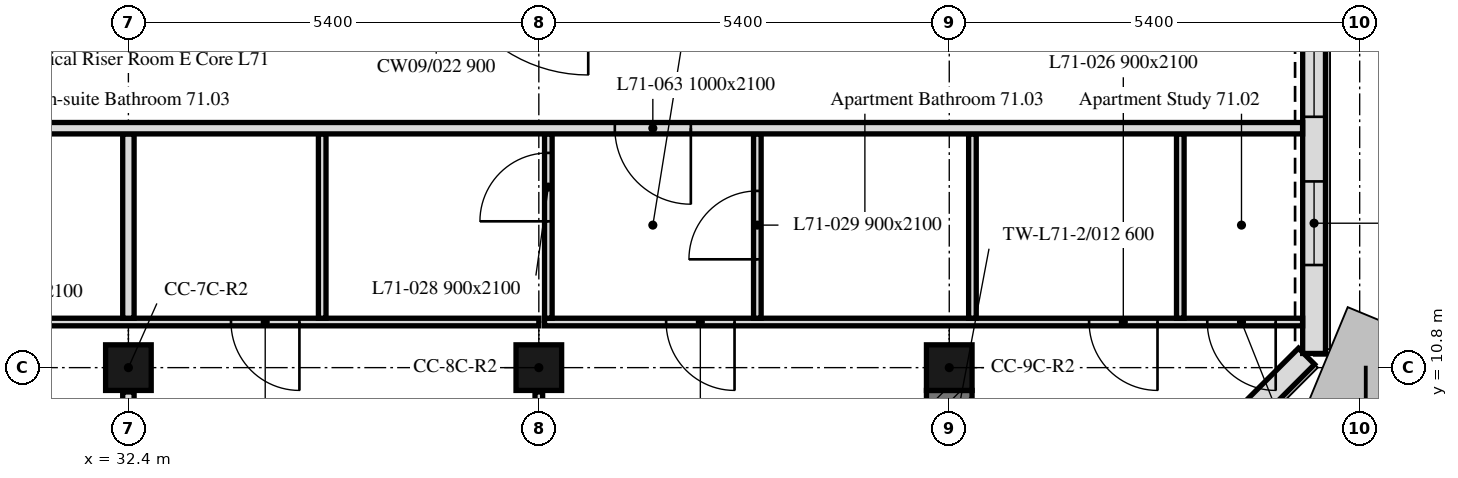
"""IFC4 building model, lengths in metres.
Left out: names, types, materials, properties, quantities, classifications, styles, units other than length and angle.
Written with IfcOpenShell. Run it as: python <this file> out.ifc"""

import sys

from ifc_helpers import new_model, si_unit, direction, frame, frame_2d, origin, origin_2d, place, context, subcontext, project, spatial, rectangle, extrude, element, fill, save


model = new_model("IFC4")
c1 = context("Model", 3, precision=1e-05, world=origin(), true_north=direction((0.0, 1.0)))
c2 = subcontext(c1, "Body", "Model", "MODEL_VIEW")
j1 = project(units=[si_unit("LENGTHUNIT", "METRE"), si_unit("PLANEANGLEUNIT", "RADIAN")], contexts=[c1])
p1 = place(None, origin())
s1 = spatial("IfcSite", under=j1, at=p1, CompositionType="ELEMENT")
p2 = place(p1, origin())
s2 = spatial("IfcBuilding", under=s1, at=p2, CompositionType="ELEMENT")
p3 = place(p2, frame((0.0, 0.0, 288.4)))
s3 = spatial("IfcBuildingStorey", under=s2, at=p3, CompositionType="ELEMENT", Elevation=288.4)
for number, where, z_axis, x_axis in (
    (1, (32.4, 10.8, 0.0), (0.0, 0.0, 1.0), (1.0, 0.0, 0.0)),
    (2, (37.8, 10.8, 0.0), (0.0, 0.0, 1.0), (1.0, 0.0, 0.0)),
    (3, (43.2, 10.8, 0.0), (0.0, 0.0, 1.0), (1.0, 0.0, 0.0)),
):
    element("IfcColumn", number, at=place(p3, frame(where, z_axis=z_axis, x_axis=x_axis)), inside=s3, PredefinedType="COLUMN", context=c2, shape_type="SweptSolid", body=[
        extrude(rectangle(XDim=0.6, YDim=0.6, at=origin_2d()), origin(), (0.0, 0.0, 1.0), 3.0),
    ])
p4 = place(p3, frame((43.2, 8.7, 0.0), z_axis=(0.0, 0.0, 1.0), x_axis=(0.0, 1.0, 0.0)))
e4 = element("IfcWall", 4, at=p4, inside=s3, PredefinedType="SHEAR", context=c2, shape_type="SweptSolid", body=[
    extrude(rectangle(XDim=1.8, YDim=0.6, at=frame_2d((0.9, 0.0))), origin(), (0.0, 0.0, 1.0), 3.0),
])
p5 = place(p3, frame((43.051, 6.099, 0.0), z_axis=(0.0, 0.0, 1.0), x_axis=(0.707106781187, 0.707106781187, 0.0)))
e5 = element("IfcWall", 5, at=p5, inside=s3, PredefinedType="SOLIDWALL", context=c2, shape_type="SweptSolid", body=[
    extrude(rectangle(XDim=6.86, YDim=0.3, at=frame_2d((3.43, 0.0))), origin(), (0.0, 0.0, 1.0), 3.0),
])
p6 = place(p5, frame((1.73, 0.0, 0.9)))
e6 = element("IfcOpeningElement", 6, at=p6, cuts=e5, PredefinedType="OPENING", context=c2, shape_type="SweptSolid", body=[
    extrude(rectangle(XDim=3.4, YDim=1.7, at=frame_2d((1.7, 0.85))), frame((0.0, 0.16, 0.0), z_axis=(0.0, -1.0, 0.0), x_axis=(1.0, 0.0, 0.0)), (0.0, 0.0, 1.0), 0.32),
])
p7 = place(p3, frame((48.0, 10.986, 0.0), z_axis=(0.0, 0.0, 1.0), x_axis=(0.0, 1.0, 0.0)))
e7 = element("IfcWall", 7, at=p7, inside=s3, PredefinedType="SOLIDWALL", context=c2, shape_type="SweptSolid", body=[
    extrude(rectangle(XDim=32.027, YDim=0.3, at=frame_2d((16.014, 0.0))), origin(), (0.0, 0.0, 1.0), 3.0),
])
p8 = place(p7, frame((1.164, 0.0, 0.9)))
e8 = element("IfcOpeningElement", 8, at=p8, cuts=e7, PredefinedType="OPENING", context=c2, shape_type="SweptSolid", body=[
    extrude(rectangle(XDim=1.1, YDim=1.7, at=frame_2d((0.55, 0.85))), frame((0.0, 0.16, 0.0), z_axis=(0.0, -1.0, 0.0), x_axis=(1.0, 0.0, 0.0)), (0.0, 0.0, 1.0), 0.32),
])
p9 = place(p7, frame((3.114, 0.0, 0.9)))
e9 = element("IfcOpeningElement", 9, at=p9, cuts=e7, PredefinedType="OPENING", context=c2, shape_type="SweptSolid", body=[
    extrude(rectangle(XDim=1.1, YDim=1.7, at=frame_2d((0.55, 0.85))), frame((0.0, 0.16, 0.0), z_axis=(0.0, -1.0, 0.0), x_axis=(1.0, 0.0, 0.0)), (0.0, 0.0, 1.0), 0.32),
])
p10 = place(p7, frame((7.664, 0.0, 0.9)))
e10 = element("IfcOpeningElement", 10, at=p10, cuts=e7, PredefinedType="OPENING", context=c2, shape_type="SweptSolid", body=[
    extrude(rectangle(XDim=0.5, YDim=1.7, at=frame_2d((0.25, 0.85))), frame((0.0, 0.16, 0.0), z_axis=(0.0, -1.0, 0.0), x_axis=(1.0, 0.0, 0.0)), (0.0, 0.0, 1.0), 0.32),
])
p11 = place(p7, frame((13.064, 0.0, 0.9)))
e11 = element("IfcOpeningElement", 11, at=p11, cuts=e7, PredefinedType="OPENING", context=c2, shape_type="SweptSolid", body=[
    extrude(rectangle(XDim=0.5, YDim=1.7, at=frame_2d((0.25, 0.85))), frame((0.0, 0.16, 0.0), z_axis=(0.0, -1.0, 0.0), x_axis=(1.0, 0.0, 0.0)), (0.0, 0.0, 1.0), 0.32),
])
p12 = place(p7, frame((18.464, 0.0, 0.9)))
e12 = element("IfcOpeningElement", 12, at=p12, cuts=e7, PredefinedType="OPENING", context=c2, shape_type="SweptSolid", body=[
    extrude(rectangle(XDim=0.5, YDim=1.7, at=frame_2d((0.25, 0.85))), frame((0.0, 0.16, 0.0), z_axis=(0.0, -1.0, 0.0), x_axis=(1.0, 0.0, 0.0)), (0.0, 0.0, 1.0), 0.32),
])
p13 = place(p7, frame((23.864, 0.0, 0.9)))
e13 = element("IfcOpeningElement", 13, at=p13, cuts=e7, PredefinedType="OPENING", context=c2, shape_type="SweptSolid", body=[
    extrude(rectangle(XDim=0.5, YDim=1.7, at=frame_2d((0.25, 0.85))), frame((0.0, 0.16, 0.0), z_axis=(0.0, -1.0, 0.0), x_axis=(1.0, 0.0, 0.0)), (0.0, 0.0, 1.0), 0.32),
])
p14 = place(p7, frame((28.164, 0.0, 0.9)))
e14 = element("IfcOpeningElement", 14, at=p14, cuts=e7, PredefinedType="OPENING", context=c2, shape_type="SweptSolid", body=[
    extrude(rectangle(XDim=1.1, YDim=1.7, at=frame_2d((0.55, 0.85))), frame((0.0, 0.16, 0.0), z_axis=(0.0, -1.0, 0.0), x_axis=(1.0, 0.0, 0.0)), (0.0, 0.0, 1.0), 0.32),
])
p15 = place(p7, frame((29.589, 0.0, 0.9)))
e15 = element("IfcOpeningElement", 15, at=p15, cuts=e7, PredefinedType="OPENING", context=c2, shape_type="SweptSolid", body=[
    extrude(rectangle(XDim=0.65, YDim=1.7, at=frame_2d((0.325, 0.85))), frame((0.0, 0.16, 0.0), z_axis=(0.0, -1.0, 0.0), x_axis=(1.0, 0.0, 0.0)), (0.0, 0.0, 1.0), 0.32),
])
p16 = place(p3, frame((37.8, 11.4, 0.0), z_axis=(0.0, 0.0, 1.0), x_axis=(-1.0, 0.0, 0.0)))
e16 = element("IfcWall", 16, at=p16, inside=s3, PredefinedType="PARTITIONING", context=c2, shape_type="SweptSolid", body=[
    extrude(rectangle(XDim=21.6, YDim=0.1, at=frame_2d((10.8, 0.0))), origin(), (0.0, 0.0, 1.0), 3.0),
])
p17 = place(p16, frame((18.87, 0.0, 0.0)))
e17 = element("IfcOpeningElement", 17, at=p17, cuts=e16, PredefinedType="OPENING", context=c2, shape_type="SweptSolid", body=[
    extrude(rectangle(XDim=0.9, YDim=2.1, at=frame_2d((0.45, 1.05))), frame((0.0, 0.05, 0.0), z_axis=(0.0, -1.0, 0.0), x_axis=(1.0, 0.0, 0.0)), (0.0, 0.0, 1.0), 0.1),
])
p18 = place(p16, frame((17.5, 0.0, 0.0)))
e18 = element("IfcOpeningElement", 18, at=p18, cuts=e16, PredefinedType="OPENING", context=c2, shape_type="SweptSolid", body=[
    extrude(rectangle(XDim=0.9, YDim=2.1, at=frame_2d((0.45, 1.05))), frame((0.0, 0.05, 0.0), z_axis=(0.0, -1.0, 0.0), x_axis=(1.0, 0.0, 0.0)), (0.0, 0.0, 1.0), 0.1),
])
p19 = place(p16, frame((6.917, 0.0, 0.0)))
e19 = element("IfcOpeningElement", 19, at=p19, cuts=e16, PredefinedType="OPENING", context=c2, shape_type="SweptSolid", body=[
    extrude(rectangle(XDim=0.9, YDim=2.1, at=frame_2d((0.45, 1.05))), frame((0.0, 0.05, 0.0), z_axis=(0.0, -1.0, 0.0), x_axis=(1.0, 0.0, 0.0)), (0.0, 0.0, 1.0), 0.1),
])
p20 = place(p16, frame((3.15, 0.0, 0.0)))
e20 = element("IfcOpeningElement", 20, at=p20, cuts=e16, PredefinedType="OPENING", context=c2, shape_type="SweptSolid", body=[
    extrude(rectangle(XDim=0.9, YDim=2.1, at=frame_2d((0.45, 1.05))), frame((0.0, 0.05, 0.0), z_axis=(0.0, -1.0, 0.0), x_axis=(1.0, 0.0, 0.0)), (0.0, 0.0, 1.0), 0.1),
])
p21 = place(p16, frame((14.158, 0.0, 0.0)))
e21 = element("IfcOpeningElement", 21, at=p21, cuts=e16, PredefinedType="OPENING", context=c2, shape_type="SweptSolid", body=[
    extrude(rectangle(XDim=0.9, YDim=2.1, at=frame_2d((0.45, 1.05))), frame((0.0, 0.05, 0.0), z_axis=(0.0, -1.0, 0.0), x_axis=(1.0, 0.0, 0.0)), (0.0, 0.0, 1.0), 0.1),
])
p22 = place(p16, frame((12.788, 0.0, 0.0)))
e22 = element("IfcOpeningElement", 22, at=p22, cuts=e16, PredefinedType="OPENING", context=c2, shape_type="SweptSolid", body=[
    extrude(rectangle(XDim=0.9, YDim=2.1, at=frame_2d((0.45, 1.05))), frame((0.0, 0.05, 0.0), z_axis=(0.0, -1.0, 0.0), x_axis=(1.0, 0.0, 0.0)), (0.0, 0.0, 1.0), 0.1),
])
p23 = place(p3, frame((32.4, 6.151, 0.0), z_axis=(0.0, 0.0, 1.0), x_axis=(0.0, 1.0, 0.0)))
e23 = element("IfcWall", 23, at=p23, inside=s3, PredefinedType="PARTITIONING", context=c2, shape_type="SweptSolid", body=[
    extrude(rectangle(XDim=4.329, YDim=0.15, at=frame_2d((2.165, 0.0))), origin(), (0.0, 0.0, 1.0), 3.0),
])
p24 = place(p3, frame((32.4, 11.45, 0.0), z_axis=(0.0, 0.0, 1.0), x_axis=(0.0, 1.0, 0.0)))
e24 = element("IfcWall", 24, at=p24, inside=s3, PredefinedType="PARTITIONING", context=c2, shape_type="SweptSolid", body=[
    extrude(rectangle(XDim=2.425, YDim=0.15, at=frame_2d((1.212, 0.0))), origin(), (0.0, 0.0, 1.0), 3.0),
])
p25 = place(p3, frame((37.8, 6.151, 0.0), z_axis=(0.0, 0.0, 1.0), x_axis=(0.0, 1.0, 0.0)))
e25 = element("IfcWall", 25, at=p25, inside=s3, PredefinedType="PARTITIONING", context=c2, shape_type="SweptSolid", body=[
    extrude(rectangle(XDim=4.329, YDim=0.1, at=frame_2d((2.165, 0.0))), origin(), (0.0, 0.0, 1.0), 3.0),
])
p26 = place(p25, frame((1.424, 0.0, 0.0)))
e26 = element("IfcOpeningElement", 26, at=p26, cuts=e25, PredefinedType="OPENING", context=c2, shape_type="SweptSolid", body=[
    extrude(rectangle(XDim=0.9, YDim=2.1, at=frame_2d((0.45, 1.05))), frame((0.0, 0.05, 0.0), z_axis=(0.0, -1.0, 0.0), x_axis=(1.0, 0.0, 0.0)), (0.0, 0.0, 1.0), 0.1),
])
p27 = place(p3, frame((47.849, 11.4, 0.0), z_axis=(0.0, 0.0, 1.0), x_axis=(-1.0, 0.0, 0.0)))
e27 = element("IfcWall", 27, at=p27, inside=s3, PredefinedType="PARTITIONING", context=c2, shape_type="SweptSolid", body=[
    extrude(rectangle(XDim=9.974, YDim=0.1, at=frame_2d((4.987, 0.0))), origin(), (0.0, 0.0, 1.0), 3.0),
])
p28 = place(p27, frame((1.909, 0.0, 0.0)))
e28 = element("IfcOpeningElement", 28, at=p28, cuts=e27, PredefinedType="OPENING", context=c2, shape_type="SweptSolid", body=[
    extrude(rectangle(XDim=0.9, YDim=2.1, at=frame_2d((0.45, 1.05))), frame((0.0, 0.05, 0.0), z_axis=(0.0, -1.0, 0.0), x_axis=(1.0, 0.0, 0.0)), (0.0, 0.0, 1.0), 0.1),
])
p29 = place(p27, frame((0.354, 0.0, 0.0)))
e29 = element("IfcOpeningElement", 29, at=p29, cuts=e27, PredefinedType="OPENING", context=c2, shape_type="SweptSolid", body=[
    extrude(rectangle(XDim=0.9, YDim=2.1, at=frame_2d((0.45, 1.05))), frame((0.0, 0.05, 0.0), z_axis=(0.0, -1.0, 0.0), x_axis=(1.0, 0.0, 0.0)), (0.0, 0.0, 1.0), 0.1),
])
p30 = place(p27, frame((7.474, 0.0, 0.0)))
e30 = element("IfcOpeningElement", 30, at=p30, cuts=e27, PredefinedType="OPENING", context=c2, shape_type="SweptSolid", body=[
    extrude(rectangle(XDim=0.9, YDim=2.1, at=frame_2d((0.45, 1.05))), frame((0.0, 0.05, 0.0), z_axis=(0.0, -1.0, 0.0), x_axis=(1.0, 0.0, 0.0)), (0.0, 0.0, 1.0), 0.1),
])
p31 = place(p3, frame((34.95, 11.45, 0.0), z_axis=(0.0, 0.0, 1.0), x_axis=(0.0, 1.0, 0.0)))
e31 = element("IfcWall", 31, at=p31, inside=s3, PredefinedType="PARTITIONING", context=c2, shape_type="SweptSolid", body=[
    extrude(rectangle(XDim=2.425, YDim=0.1, at=frame_2d((1.212, 0.0))), origin(), (0.0, 0.0, 1.0), 3.0),
])
p32 = place(p3, frame((37.925, 11.45, 0.0), z_axis=(0.0, 0.0, 1.0), x_axis=(0.0, 1.0, 0.0)))
e32 = element("IfcWall", 32, at=p32, inside=s3, PredefinedType="PARTITIONING", context=c2, shape_type="SweptSolid", body=[
    extrude(rectangle(XDim=2.425, YDim=0.1, at=frame_2d((1.212, 0.0))), origin(), (0.0, 0.0, 1.0), 3.0),
])
p33 = place(p32, frame((1.275, 0.0, 0.0)))
e33 = element("IfcOpeningElement", 33, at=p33, cuts=e32, PredefinedType="OPENING", context=c2, shape_type="SweptSolid", body=[
    extrude(rectangle(XDim=0.9, YDim=2.1, at=frame_2d((0.45, 1.05))), frame((0.0, 0.05, 0.0), z_axis=(0.0, -1.0, 0.0), x_axis=(1.0, 0.0, 0.0)), (0.0, 0.0, 1.0), 0.1),
])
p34 = place(p3, frame((40.675, 11.45, 0.0), z_axis=(0.0, 0.0, 1.0), x_axis=(0.0, 1.0, 0.0)))
e34 = element("IfcWall", 34, at=p34, inside=s3, PredefinedType="PARTITIONING", context=c2, shape_type="SweptSolid", body=[
    extrude(rectangle(XDim=2.425, YDim=0.1, at=frame_2d((1.212, 0.0))), origin(), (0.0, 0.0, 1.0), 3.0),
])
p35 = place(p34, frame((0.775, 0.0, 0.0)))
e35 = element("IfcOpeningElement", 35, at=p35, cuts=e34, PredefinedType="OPENING", context=c2, shape_type="SweptSolid", body=[
    extrude(rectangle(XDim=0.9, YDim=2.1, at=frame_2d((0.45, 1.05))), frame((0.0, 0.05, 0.0), z_axis=(0.0, -1.0, 0.0), x_axis=(1.0, 0.0, 0.0)), (0.0, 0.0, 1.0), 0.1),
])
for number, where, z_axis, x_axis in (
    (36, (43.505, 11.45, 0.0), (0.0, 0.0, 1.0), (0.0, 1.0, 0.0)),
    (37, (46.24, 11.45, 0.0), (0.0, 0.0, 1.0), (0.0, 1.0, 0.0)),
):
    element("IfcWall", number, at=place(p3, frame(where, z_axis=z_axis, x_axis=x_axis)), inside=s3, PredefinedType="PARTITIONING", context=c2, shape_type="SweptSolid", body=[
        extrude(rectangle(XDim=2.425, YDim=0.1, at=frame_2d((1.212, 0.0))), origin(), (0.0, 0.0, 1.0), 3.0),
    ])
p36 = place(p3, frame((47.849, 13.95, 0.0), z_axis=(0.0, 0.0, 1.0), x_axis=(-1.0, 0.0, 0.0)))
e38 = element("IfcWall", 38, at=p36, inside=s3, PredefinedType="PARTITIONING", context=c2, shape_type="SweptSolid", body=[
    extrude(rectangle(XDim=41.698, YDim=0.15, at=frame_2d((20.849, 0.0))), origin(), (0.0, 0.0, 1.0), 3.0),
])
p37 = place(p36, frame((35.609, 0.0, 0.0)))
e39 = element("IfcOpeningElement", 39, at=p37, cuts=e38, PredefinedType="OPENING", context=c2, shape_type="SweptSolid", body=[
    extrude(rectangle(XDim=1.0, YDim=2.1, at=frame_2d((0.5, 1.05))), frame((0.0, 0.075, 0.0), z_axis=(0.0, -1.0, 0.0), x_axis=(1.0, 0.0, 0.0)), (0.0, 0.0, 1.0), 0.15),
])
p38 = place(p36, frame((22.354, 0.0, 0.0)))
e40 = element("IfcOpeningElement", 40, at=p38, cuts=e38, PredefinedType="OPENING", context=c2, shape_type="SweptSolid", body=[
    extrude(rectangle(XDim=1.0, YDim=2.1, at=frame_2d((0.5, 1.05))), frame((0.0, 0.075, 0.0), z_axis=(0.0, -1.0, 0.0), x_axis=(1.0, 0.0, 0.0)), (0.0, 0.0, 1.0), 0.15),
])
p39 = place(p36, frame((8.049, 0.0, 0.0)))
e41 = element("IfcOpeningElement", 41, at=p39, cuts=e38, PredefinedType="OPENING", context=c2, shape_type="SweptSolid", body=[
    extrude(rectangle(XDim=1.0, YDim=2.1, at=frame_2d((0.5, 1.05))), frame((0.0, 0.075, 0.0), z_axis=(0.0, -1.0, 0.0), x_axis=(1.0, 0.0, 0.0)), (0.0, 0.0, 1.0), 0.15),
])
p40 = place(p8, origin())
e42 = element("IfcWindow", 42, at=p40, inside=s3, PartitioningType="SINGLE_PANEL", PredefinedType="WINDOW", context=c2, shape_type="SweptSolid", body=[
    extrude(rectangle(XDim=1.1, YDim=1.7, at=frame_2d((0.55, 0.85))), frame((0.0, 0.03, 0.0), z_axis=(0.0, -1.0, 0.0), x_axis=(1.0, 0.0, 0.0)), (0.0, 0.0, 1.0), 0.06),
])
fill(e8, e42)
p41 = place(p9, origin())
e43 = element("IfcWindow", 43, at=p41, inside=s3, PartitioningType="SINGLE_PANEL", PredefinedType="WINDOW", context=c2, shape_type="SweptSolid", body=[
    extrude(rectangle(XDim=1.1, YDim=1.7, at=frame_2d((0.55, 0.85))), frame((0.0, 0.03, 0.0), z_axis=(0.0, -1.0, 0.0), x_axis=(1.0, 0.0, 0.0)), (0.0, 0.0, 1.0), 0.06),
])
fill(e9, e43)
p42 = place(p20, origin())
e44 = element("IfcDoor", 44, at=p42, inside=s3, OperationType="SINGLE_SWING_RIGHT", PredefinedType="DOOR", context=c2, shape_type="SweptSolid", body=[
    extrude(rectangle(XDim=0.9, YDim=2.1, at=frame_2d((0.45, 1.05))), frame((0.0, 0.025, 0.0), z_axis=(0.0, -1.0, 0.0), x_axis=(1.0, 0.0, 0.0)), (0.0, 0.0, 1.0), 0.05),
])
fill(e20, e44)
p43 = place(p28, origin())
e45 = element("IfcDoor", 45, at=p43, inside=s3, OperationType="SINGLE_SWING_LEFT", PredefinedType="DOOR", context=c2, shape_type="SweptSolid", body=[
    extrude(rectangle(XDim=0.9, YDim=2.1, at=frame_2d((0.45, 1.05))), frame((0.0, 0.025, 0.0), z_axis=(0.0, -1.0, 0.0), x_axis=(1.0, 0.0, 0.0)), (0.0, 0.0, 1.0), 0.05),
])
fill(e28, e45)
p44 = place(p29, origin())
e46 = element("IfcDoor", 46, at=p44, inside=s3, OperationType="SINGLE_SWING_RIGHT", PredefinedType="DOOR", context=c2, shape_type="SweptSolid", body=[
    extrude(rectangle(XDim=0.9, YDim=2.1, at=frame_2d((0.45, 1.05))), frame((0.0, 0.025, 0.0), z_axis=(0.0, -1.0, 0.0), x_axis=(1.0, 0.0, 0.0)), (0.0, 0.0, 1.0), 0.05),
])
fill(e29, e46)
p45 = place(p33, origin())
e47 = element("IfcDoor", 47, at=p45, inside=s3, OperationType="SINGLE_SWING_RIGHT", PredefinedType="DOOR", context=c2, shape_type="SweptSolid", body=[
    extrude(rectangle(XDim=0.9, YDim=2.1, at=frame_2d((0.45, 1.05))), frame((0.0, 0.025, 0.0), z_axis=(0.0, -1.0, 0.0), x_axis=(1.0, 0.0, 0.0)), (0.0, 0.0, 1.0), 0.05),
])
fill(e33, e47)
p46 = place(p35, origin())
e48 = element("IfcDoor", 48, at=p46, inside=s3, OperationType="SINGLE_SWING_LEFT", PredefinedType="DOOR", context=c2, shape_type="SweptSolid", body=[
    extrude(rectangle(XDim=0.9, YDim=2.1, at=frame_2d((0.45, 1.05))), frame((0.0, 0.025, 0.0), z_axis=(0.0, -1.0, 0.0), x_axis=(1.0, 0.0, 0.0)), (0.0, 0.0, 1.0), 0.05),
])
fill(e35, e48)
p47 = place(p30, origin())
e49 = element("IfcDoor", 49, at=p47, inside=s3, OperationType="SINGLE_SWING_RIGHT", PredefinedType="DOOR", context=c2, shape_type="SweptSolid", body=[
    extrude(rectangle(XDim=0.9, YDim=2.1, at=frame_2d((0.45, 1.05))), frame((0.0, 0.025, 0.0), z_axis=(0.0, -1.0, 0.0), x_axis=(1.0, 0.0, 0.0)), (0.0, 0.0, 1.0), 0.05),
])
fill(e30, e49)
p48 = place(p39, origin())
e50 = element("IfcDoor", 50, at=p48, inside=s3, OperationType="SINGLE_SWING_LEFT", PredefinedType="DOOR", context=c2, shape_type="SweptSolid", body=[
    extrude(rectangle(XDim=1.0, YDim=2.1, at=frame_2d((0.5, 1.05))), frame((0.0, 0.025, 0.0), z_axis=(0.0, -1.0, 0.0), x_axis=(1.0, 0.0, 0.0)), (0.0, 0.0, 1.0), 0.05),
])
fill(e41, e50)
save(model, sys.argv[1])
